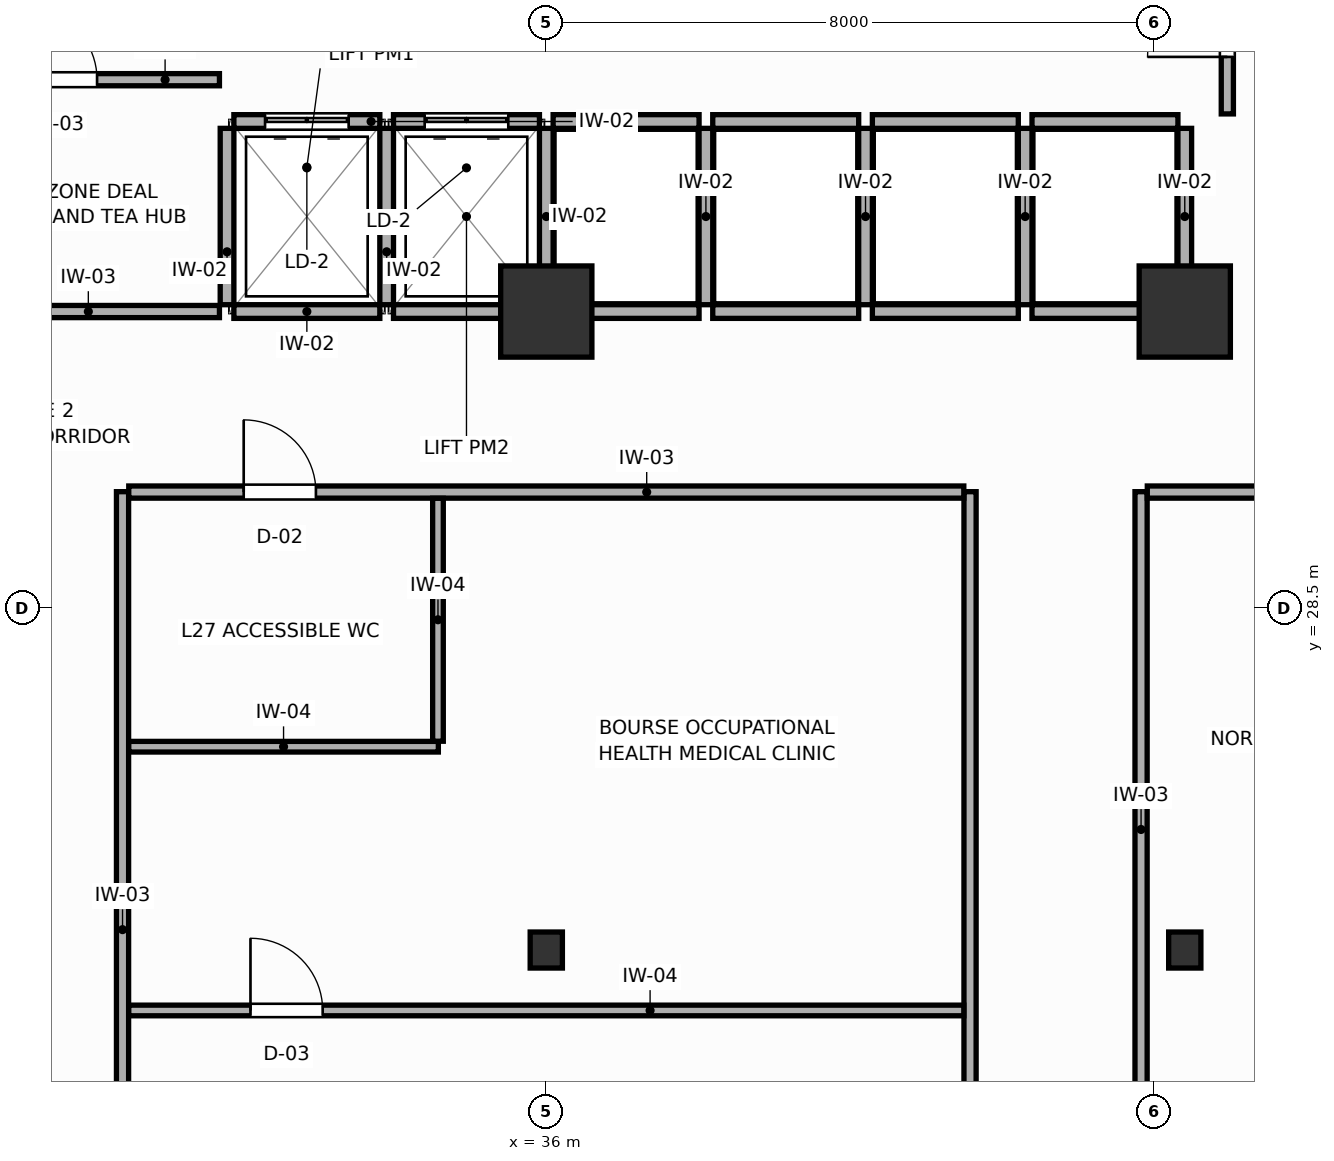
"""IFC4 building model, lengths in metres.
Left out: names, types, materials, properties, quantities, classifications, styles, units other than length and angle.
Written with IfcOpenShell. Run it as: python <this file> out.ifc"""

import sys

from ifc_helpers import new_model, si_unit, direction, frame, frame_2d, origin, origin_2d, place, context, subcontext, project, spatial, rectangle, i_section, extrude, source, transform, mapped, element, fill, save


model = new_model("IFC4")
c1 = context("Model", 3, precision=1e-05, world=origin(), true_north=direction((0.0, 1.0)))
c2 = subcontext(c1, "Body", "Model", "MODEL_VIEW")
j1 = project(units=[si_unit("LENGTHUNIT", "METRE"), si_unit("PLANEANGLEUNIT", "RADIAN")], contexts=[c1])
p1 = place(None, origin())
s1 = spatial("IfcSite", under=j1, at=p1, CompositionType="ELEMENT")
p2 = place(p1, origin())
s2 = spatial("IfcBuilding", under=s1, at=p2, CompositionType="ELEMENT")
p3 = place(p2, frame((0.0, 0.0, 109.8)))
s3 = spatial("IfcBuildingStorey", under=s2, at=p3, CompositionType="ELEMENT", Elevation=109.8)
m1 = source(origin(), c2, "Body", "SweptSolid", [
    extrude(rectangle(XDim=1.2, YDim=1.2, at=origin_2d()), origin(), (0.0, 0.0, 1.0), 3.6),
])
for number, where, z_axis, x_axis in (
    (1, (44.4, 32.4, 0.0), (0.0, 0.0, 1.0), (1.0, 0.0, 0.0)),
    (2, (36.0, 32.4, 0.0), (0.0, 0.0, 1.0), (1.0, 0.0, 0.0)),
):
    element("IfcColumn", number, at=place(p3, frame(where, z_axis=z_axis, x_axis=x_axis)), inside=s3, PredefinedType="COLUMN", context=c2, shape_type="MappedRepresentation", body=[
        mapped(m1, transform((0.0, 0.0, 0.0), scale=1.0)),
    ])
m2 = source(origin(), c2, "Body", "SweptSolid", [
    extrude(i_section(OverallWidth=0.424, OverallDepth=0.474, WebThickness=0.045, FlangeThickness=0.072, FilletRadius=0.015, at=origin_2d()), origin(), (0.0, 0.0, 1.0), 3.6),
])
for number, where, z_axis, x_axis in (
    (3, (44.4, 24.0, 0.0), (0.0, 0.0, 1.0), (1.0, 0.0, 0.0)),
    (4, (36.0, 24.0, 0.0), (0.0, 0.0, 1.0), (1.0, 0.0, 0.0)),
):
    element("IfcColumn", number, at=place(p3, frame(where, z_axis=z_axis, x_axis=x_axis)), inside=s3, PredefinedType="COLUMN", context=c2, shape_type="MappedRepresentation", body=[
        mapped(m2, transform((0.0, 0.0, 0.0), scale=1.0)),
    ])
p4 = place(p3, frame((31.89, 34.9, 0.0), z_axis=(0.0, 0.0, 1.0), x_axis=(1.0, 0.0, 0.0)))
e5 = element("IfcWall", 5, at=p4, inside=s3, PredefinedType="PARTITIONING", context=c2, shape_type="SweptSolid", body=[
    extrude(rectangle(XDim=1.92, YDim=0.18, at=frame_2d((0.96, 0.0))), origin(), (0.0, 0.0, 1.0), 3.4),
])
p5 = place(p4, frame((0.41, 0.0, 0.0)))
e6 = element("IfcOpeningElement", 6, at=p5, cuts=e5, PredefinedType="OPENING", context=c2, shape_type="SweptSolid", body=[
    extrude(rectangle(XDim=1.1, YDim=2.1, at=frame_2d((0.55, 1.05))), frame((0.0, 0.1, 0.0), z_axis=(0.0, -1.0, 0.0), x_axis=(1.0, 0.0, 0.0)), (0.0, 0.0, 1.0), 0.2),
])
p6 = place(p3, frame((31.89, 32.4, 0.0), z_axis=(0.0, 0.0, 1.0), x_axis=(1.0, 0.0, 0.0)))
e7 = element("IfcWall", 7, at=p6, inside=s3, PredefinedType="PARTITIONING", context=c2, shape_type="SweptSolid", body=[
    extrude(rectangle(XDim=1.92, YDim=0.18, at=frame_2d((0.96, 0.0))), origin(), (0.0, 0.0, 1.0), 2.16),
])
p7 = place(p3, frame((31.8, 32.49, 0.0), z_axis=(0.0, 0.0, 1.0), x_axis=(0.0, 1.0, 0.0)))
e8 = element("IfcWall", 8, at=p7, inside=s3, PredefinedType="PARTITIONING", context=c2, shape_type="SweptSolid", body=[
    extrude(rectangle(XDim=2.32, YDim=0.18, at=frame_2d((1.16, 0.0))), origin(), (0.0, 0.0, 1.0), 3.4),
])
p8 = place(p3, frame((33.99, 34.9, 0.0), z_axis=(0.0, 0.0, 1.0), x_axis=(1.0, 0.0, 0.0)))
e9 = element("IfcWall", 9, at=p8, inside=s3, PredefinedType="PARTITIONING", context=c2, shape_type="SweptSolid", body=[
    extrude(rectangle(XDim=1.92, YDim=0.18, at=frame_2d((0.96, 0.0))), origin(), (0.0, 0.0, 1.0), 3.4),
])
p9 = place(p8, frame((0.41, 0.0, 0.0)))
e10 = element("IfcOpeningElement", 10, at=p9, cuts=e9, PredefinedType="OPENING", context=c2, shape_type="SweptSolid", body=[
    extrude(rectangle(XDim=1.1, YDim=2.1, at=frame_2d((0.55, 1.05))), frame((0.0, 0.1, 0.0), z_axis=(0.0, -1.0, 0.0), x_axis=(1.0, 0.0, 0.0)), (0.0, 0.0, 1.0), 0.2),
])
p10 = place(p3, frame((33.99, 32.4, 0.0), z_axis=(0.0, 0.0, 1.0), x_axis=(1.0, 0.0, 0.0)))
e11 = element("IfcWall", 11, at=p10, inside=s3, PredefinedType="PARTITIONING", context=c2, shape_type="SweptSolid", body=[
    extrude(rectangle(XDim=1.92, YDim=0.18, at=frame_2d((0.96, 0.0))), origin(), (0.0, 0.0, 1.0), 2.16),
])
p11 = place(p3, frame((33.9, 32.49, 0.0), z_axis=(0.0, 0.0, 1.0), x_axis=(0.0, 1.0, 0.0)))
e12 = element("IfcWall", 12, at=p11, inside=s3, PredefinedType="PARTITIONING", context=c2, shape_type="SweptSolid", body=[
    extrude(rectangle(XDim=2.32, YDim=0.18, at=frame_2d((1.16, 0.0))), origin(), (0.0, 0.0, 1.0), 3.4),
])
p12 = place(p3, frame((36.09, 34.9, 0.0), z_axis=(0.0, 0.0, 1.0), x_axis=(1.0, 0.0, 0.0)))
e13 = element("IfcWall", 13, at=p12, inside=s3, PredefinedType="PARTITIONING", context=c2, shape_type="SweptSolid", body=[
    extrude(rectangle(XDim=1.92, YDim=0.18, at=frame_2d((0.96, 0.0))), origin(), (0.0, 0.0, 1.0), 3.4),
])
p13 = place(p3, frame((36.09, 32.4, 0.0), z_axis=(0.0, 0.0, 1.0), x_axis=(1.0, 0.0, 0.0)))
e14 = element("IfcWall", 14, at=p13, inside=s3, PredefinedType="PARTITIONING", context=c2, shape_type="SweptSolid", body=[
    extrude(rectangle(XDim=1.92, YDim=0.18, at=frame_2d((0.96, 0.0))), origin(), (0.0, 0.0, 1.0), 2.16),
])
p14 = place(p3, frame((36.0, 32.49, 0.0), z_axis=(0.0, 0.0, 1.0), x_axis=(0.0, 1.0, 0.0)))
e15 = element("IfcWall", 15, at=p14, inside=s3, PredefinedType="PARTITIONING", context=c2, shape_type="SweptSolid", body=[
    extrude(rectangle(XDim=2.32, YDim=0.18, at=frame_2d((1.16, 0.0))), origin(), (0.0, 0.0, 1.0), 3.4),
])
p15 = place(p3, frame((38.19, 34.9, 0.0), z_axis=(0.0, 0.0, 1.0), x_axis=(1.0, 0.0, 0.0)))
e16 = element("IfcWall", 16, at=p15, inside=s3, PredefinedType="PARTITIONING", context=c2, shape_type="SweptSolid", body=[
    extrude(rectangle(XDim=1.92, YDim=0.18, at=frame_2d((0.96, 0.0))), origin(), (0.0, 0.0, 1.0), 3.4),
])
p16 = place(p3, frame((38.19, 32.4, 0.0), z_axis=(0.0, 0.0, 1.0), x_axis=(1.0, 0.0, 0.0)))
e17 = element("IfcWall", 17, at=p16, inside=s3, PredefinedType="PARTITIONING", context=c2, shape_type="SweptSolid", body=[
    extrude(rectangle(XDim=1.92, YDim=0.18, at=frame_2d((0.96, 0.0))), origin(), (0.0, 0.0, 1.0), 2.16),
])
p17 = place(p3, frame((38.1, 32.49, 0.0), z_axis=(0.0, 0.0, 1.0), x_axis=(0.0, 1.0, 0.0)))
e18 = element("IfcWall", 18, at=p17, inside=s3, PredefinedType="PARTITIONING", context=c2, shape_type="SweptSolid", body=[
    extrude(rectangle(XDim=2.32, YDim=0.18, at=frame_2d((1.16, 0.0))), origin(), (0.0, 0.0, 1.0), 3.4),
])
p18 = place(p3, frame((40.29, 34.9, 0.0), z_axis=(0.0, 0.0, 1.0), x_axis=(1.0, 0.0, 0.0)))
e19 = element("IfcWall", 19, at=p18, inside=s3, PredefinedType="PARTITIONING", context=c2, shape_type="SweptSolid", body=[
    extrude(rectangle(XDim=1.92, YDim=0.18, at=frame_2d((0.96, 0.0))), origin(), (0.0, 0.0, 1.0), 3.4),
])
p19 = place(p3, frame((40.29, 32.4, 0.0), z_axis=(0.0, 0.0, 1.0), x_axis=(1.0, 0.0, 0.0)))
e20 = element("IfcWall", 20, at=p19, inside=s3, PredefinedType="PARTITIONING", context=c2, shape_type="SweptSolid", body=[
    extrude(rectangle(XDim=1.92, YDim=0.18, at=frame_2d((0.96, 0.0))), origin(), (0.0, 0.0, 1.0), 2.16),
])
p20 = place(p3, frame((40.2, 32.49, 0.0), z_axis=(0.0, 0.0, 1.0), x_axis=(0.0, 1.0, 0.0)))
e21 = element("IfcWall", 21, at=p20, inside=s3, PredefinedType="PARTITIONING", context=c2, shape_type="SweptSolid", body=[
    extrude(rectangle(XDim=2.32, YDim=0.18, at=frame_2d((1.16, 0.0))), origin(), (0.0, 0.0, 1.0), 3.4),
])
p21 = place(p3, frame((42.39, 34.9, 0.0), z_axis=(0.0, 0.0, 1.0), x_axis=(1.0, 0.0, 0.0)))
e22 = element("IfcWall", 22, at=p21, inside=s3, PredefinedType="PARTITIONING", context=c2, shape_type="SweptSolid", body=[
    extrude(rectangle(XDim=1.92, YDim=0.18, at=frame_2d((0.96, 0.0))), origin(), (0.0, 0.0, 1.0), 3.4),
])
p22 = place(p3, frame((42.39, 32.4, 0.0), z_axis=(0.0, 0.0, 1.0), x_axis=(1.0, 0.0, 0.0)))
e23 = element("IfcWall", 23, at=p22, inside=s3, PredefinedType="PARTITIONING", context=c2, shape_type="SweptSolid", body=[
    extrude(rectangle(XDim=1.92, YDim=0.18, at=frame_2d((0.96, 0.0))), origin(), (0.0, 0.0, 1.0), 2.16),
])
for number, where, z_axis, x_axis in (
    (24, (42.3, 32.49, 0.0), (0.0, 0.0, 1.0), (0.0, 1.0, 0.0)),
    (25, (44.4, 32.49, 0.0), (0.0, 0.0, 1.0), (0.0, 1.0, 0.0)),
):
    element("IfcWall", number, at=place(p3, frame(where, z_axis=z_axis, x_axis=x_axis)), inside=s3, PredefinedType="PARTITIONING", context=c2, shape_type="SweptSolid", body=[
        extrude(rectangle(XDim=2.32, YDim=0.18, at=frame_2d((1.16, 0.0))), origin(), (0.0, 0.0, 1.0), 3.4),
    ])
p23 = place(p3, frame((28.25, 32.4, 0.0), z_axis=(0.0, 0.0, 1.0), x_axis=(1.0, 0.0, 0.0)))
e26 = element("IfcWall", 26, at=p23, inside=s3, PredefinedType="PARTITIONING", context=c2, shape_type="SweptSolid", body=[
    extrude(rectangle(XDim=3.45, YDim=0.16, at=frame_2d((1.725, 0.0))), origin(), (0.0, 0.0, 1.0), 2.16),
])
p24 = place(p3, frame((27.69, 35.45, 0.0), z_axis=(0.0, 0.0, 1.0), x_axis=(1.0, 0.0, 0.0)))
e27 = element("IfcWall", 27, at=p24, inside=s3, PredefinedType="PARTITIONING", context=c2, shape_type="SweptSolid", body=[
    extrude(rectangle(XDim=4.01, YDim=0.16, at=frame_2d((2.005, 0.0))), origin(), (0.0, 0.0, 1.0), 3.4),
])
p25 = place(p24, frame((1.45, 0.0, 0.0)))
e28 = element("IfcOpeningElement", 28, at=p25, cuts=e27, PredefinedType="OPENING", context=c2, shape_type="SweptSolid", body=[
    extrude(rectangle(XDim=0.95, YDim=2.05, at=frame_2d((0.475, 1.025))), frame((0.0, 0.09, 0.0), z_axis=(0.0, -1.0, 0.0), x_axis=(1.0, 0.0, 0.0)), (0.0, 0.0, 1.0), 0.18),
])
p26 = place(p3, frame((44.96, 35.0, 0.0), z_axis=(0.0, 0.0, 1.0), x_axis=(0.0, 1.0, 0.0)))
e29 = element("IfcWall", 29, at=p26, inside=s3, PredefinedType="PARTITIONING", context=c2, shape_type="SweptSolid", body=[
    extrude(rectangle(XDim=2.65, YDim=0.16, at=frame_2d((1.325, 0.0))), origin(), (0.0, 0.0, 1.0), 3.4),
])
p27 = place(p26, frame((0.75, 0.0, 0.0)))
e30 = element("IfcOpeningElement", 30, at=p27, cuts=e29, PredefinedType="OPENING", context=c2, shape_type="SweptSolid", body=[
    extrude(rectangle(XDim=1.05, YDim=2.1, at=frame_2d((0.525, 1.05))), frame((0.0, 0.09, 0.0), z_axis=(0.0, -1.0, 0.0), x_axis=(1.0, 0.0, 0.0)), (0.0, 0.0, 1.0), 0.18),
])
p28 = place(p3, frame((30.425, 12.461, 0.0), z_axis=(0.0, 0.0, 1.0), x_axis=(0.0, 1.0, 0.0)))
e31 = element("IfcWall", 31, at=p28, inside=s3, PredefinedType="PARTITIONING", context=c2, shape_type="SweptSolid", body=[
    extrude(rectangle(XDim=17.569, YDim=0.16, at=frame_2d((8.785, 0.0))), origin(), (0.0, 0.0, 1.0), 3.4),
])
p29 = place(p28, frame((4.916, 0.0, 0.0)))
e32 = element("IfcOpeningElement", 32, at=p29, cuts=e31, PredefinedType="OPENING", context=c2, shape_type="SweptSolid", body=[
    extrude(rectangle(XDim=0.95, YDim=2.05, at=frame_2d((0.475, 1.025))), frame((0.0, 0.09, 0.0), z_axis=(0.0, -1.0, 0.0), x_axis=(1.0, 0.0, 0.0)), (0.0, 0.0, 1.0), 0.18),
])
p30 = place(p3, frame((41.575, 12.461, 0.0), z_axis=(0.0, 0.0, 1.0), x_axis=(0.0, 1.0, 0.0)))
e33 = element("IfcWall", 33, at=p30, inside=s3, PredefinedType="PARTITIONING", context=c2, shape_type="SweptSolid", body=[
    extrude(rectangle(XDim=17.569, YDim=0.16, at=frame_2d((8.785, 0.0))), origin(), (0.0, 0.0, 1.0), 3.4),
])
p31 = place(p3, frame((43.825, 15.212, 0.0), z_axis=(0.0, 0.0, 1.0), x_axis=(0.0, 1.0, 0.0)))
e34 = element("IfcWall", 34, at=p31, inside=s3, PredefinedType="PARTITIONING", context=c2, shape_type="SweptSolid", body=[
    extrude(rectangle(XDim=14.818, YDim=0.16, at=frame_2d((7.409, 0.0))), origin(), (0.0, 0.0, 1.0), 3.4),
])
p32 = place(p31, frame((4.801, 0.0, 0.0)))
e35 = element("IfcOpeningElement", 35, at=p32, cuts=e34, PredefinedType="OPENING", context=c2, shape_type="SweptSolid", body=[
    extrude(rectangle(XDim=0.95, YDim=2.05, at=frame_2d((0.475, 1.025))), frame((0.0, 0.09, 0.0), z_axis=(0.0, -1.0, 0.0), x_axis=(1.0, 0.0, 0.0)), (0.0, 0.0, 1.0), 0.18),
])
p33 = place(p3, frame((30.507, 30.025, 0.0), z_axis=(0.0, 0.0, 1.0), x_axis=(1.0, 0.0, 0.0)))
e36 = element("IfcWall", 36, at=p33, inside=s3, PredefinedType="PARTITIONING", context=c2, shape_type="SweptSolid", body=[
    extrude(rectangle(XDim=10.986, YDim=0.16, at=frame_2d((5.493, 0.0))), origin(), (0.0, 0.0, 1.0), 3.4),
])
p34 = place(p33, frame((1.512, 0.0, 0.0)))
e37 = element("IfcOpeningElement", 37, at=p34, cuts=e36, PredefinedType="OPENING", context=c2, shape_type="SweptSolid", body=[
    extrude(rectangle(XDim=0.95, YDim=2.05, at=frame_2d((0.475, 1.025))), frame((0.0, 0.09, 0.0), z_axis=(0.0, -1.0, 0.0), x_axis=(1.0, 0.0, 0.0)), (0.0, 0.0, 1.0), 0.18),
])
p35 = place(p3, frame((43.907, 30.025, 0.0), z_axis=(0.0, 0.0, 1.0), x_axis=(1.0, 0.0, 0.0)))
e38 = element("IfcWall", 38, at=p35, inside=s3, PredefinedType="PARTITIONING", context=c2, shape_type="SweptSolid", body=[
    extrude(rectangle(XDim=9.806, YDim=0.16, at=frame_2d((4.903, 0.0))), origin(), (0.0, 0.0, 1.0), 3.4),
])
p36 = place(p3, frame((30.507, 23.205, 0.0), z_axis=(0.0, 0.0, 1.0), x_axis=(1.0, 0.0, 0.0)))
e39 = element("IfcWall", 39, at=p36, inside=s3, PredefinedType="PARTITIONING", context=c2, shape_type="SweptSolid", body=[
    extrude(rectangle(XDim=10.986, YDim=0.14, at=frame_2d((5.493, 0.0))), origin(), (0.0, 0.0, 1.0), 3.4),
])
p37 = place(p36, frame((1.601, 0.0, 0.0)))
e40 = element("IfcOpeningElement", 40, at=p37, cuts=e39, PredefinedType="OPENING", context=c2, shape_type="SweptSolid", body=[
    extrude(rectangle(XDim=0.95, YDim=2.05, at=frame_2d((0.475, 1.025))), frame((0.0, 0.08, 0.0), z_axis=(0.0, -1.0, 0.0), x_axis=(1.0, 0.0, 0.0)), (0.0, 0.0, 1.0), 0.16),
])
p38 = place(p3, frame((30.507, 26.675, 0.0), z_axis=(0.0, 0.0, 1.0), x_axis=(1.0, 0.0, 0.0)))
e41 = element("IfcWall", 41, at=p38, inside=s3, PredefinedType="PARTITIONING", context=c2, shape_type="SweptSolid", body=[
    extrude(rectangle(XDim=4.073, YDim=0.14, at=frame_2d((2.037, 0.0))), origin(), (0.0, 0.0, 1.0), 3.4),
])
p39 = place(p3, frame((34.575, 26.747, 0.0), z_axis=(0.0, 0.0, 1.0), x_axis=(0.0, 1.0, 0.0)))
e42 = element("IfcWall", 42, at=p39, inside=s3, PredefinedType="PARTITIONING", context=c2, shape_type="SweptSolid", body=[
    extrude(rectangle(XDim=3.196, YDim=0.14, at=frame_2d((1.598, 0.0))), origin(), (0.0, 0.0, 1.0), 3.4),
])
p40 = place(p5, origin())
e43 = element("IfcDoor", 43, at=p40, inside=s3, OperationType="DOUBLE_DOOR_SLIDING", PredefinedType="DOOR", context=c2, shape_type="SweptSolid", body=[
    extrude(rectangle(XDim=1.1, YDim=2.1, at=frame_2d((0.55, 1.05))), frame((0.0, 0.025, 0.0), z_axis=(0.0, -1.0, 0.0), x_axis=(1.0, 0.0, 0.0)), (0.0, 0.0, 1.0), 0.05),
])
fill(e6, e43)
p41 = place(p9, origin())
e44 = element("IfcDoor", 44, at=p41, inside=s3, OperationType="DOUBLE_DOOR_SLIDING", PredefinedType="DOOR", context=c2, shape_type="SweptSolid", body=[
    extrude(rectangle(XDim=1.1, YDim=2.1, at=frame_2d((0.55, 1.05))), frame((0.0, 0.025, 0.0), z_axis=(0.0, -1.0, 0.0), x_axis=(1.0, 0.0, 0.0)), (0.0, 0.0, 1.0), 0.05),
])
fill(e10, e44)
p42 = place(p25, origin())
e45 = element("IfcDoor", 45, at=p42, inside=s3, OperationType="SINGLE_SWING_LEFT", PredefinedType="DOOR", context=c2, shape_type="SweptSolid", body=[
    extrude(rectangle(XDim=0.95, YDim=2.05, at=frame_2d((0.475, 1.025))), frame((0.0, 0.025, 0.0), z_axis=(0.0, -1.0, 0.0), x_axis=(1.0, 0.0, 0.0)), (0.0, 0.0, 1.0), 0.05),
])
fill(e28, e45)
p43 = place(p27, origin())
e46 = element("IfcDoor", 46, at=p43, inside=s3, OperationType="SINGLE_SWING_LEFT", PredefinedType="DOOR", context=c2, shape_type="SweptSolid", body=[
    extrude(rectangle(XDim=1.05, YDim=2.1, at=frame_2d((0.525, 1.05))), frame((0.0, 0.025, 0.0), z_axis=(0.0, -1.0, 0.0), x_axis=(1.0, 0.0, 0.0)), (0.0, 0.0, 1.0), 0.05),
])
fill(e30, e46)
p44 = place(p34, origin())
e47 = element("IfcDoor", 47, at=p44, inside=s3, OperationType="SINGLE_SWING_LEFT", PredefinedType="DOOR", context=c2, shape_type="SweptSolid", body=[
    extrude(rectangle(XDim=0.95, YDim=2.05, at=frame_2d((0.475, 1.025))), frame((0.0, 0.025, 0.0), z_axis=(0.0, -1.0, 0.0), x_axis=(1.0, 0.0, 0.0)), (0.0, 0.0, 1.0), 0.05),
])
fill(e37, e47)
p45 = place(p37, origin())
e48 = element("IfcDoor", 48, at=p45, inside=s3, OperationType="SINGLE_SWING_LEFT", PredefinedType="DOOR", context=c2, shape_type="SweptSolid", body=[
    extrude(rectangle(XDim=0.95, YDim=2.05, at=frame_2d((0.475, 1.025))), frame((0.0, 0.025, 0.0), z_axis=(0.0, -1.0, 0.0), x_axis=(1.0, 0.0, 0.0)), (0.0, 0.0, 1.0), 0.05),
])
fill(e40, e48)
save(model, sys.argv[1])
